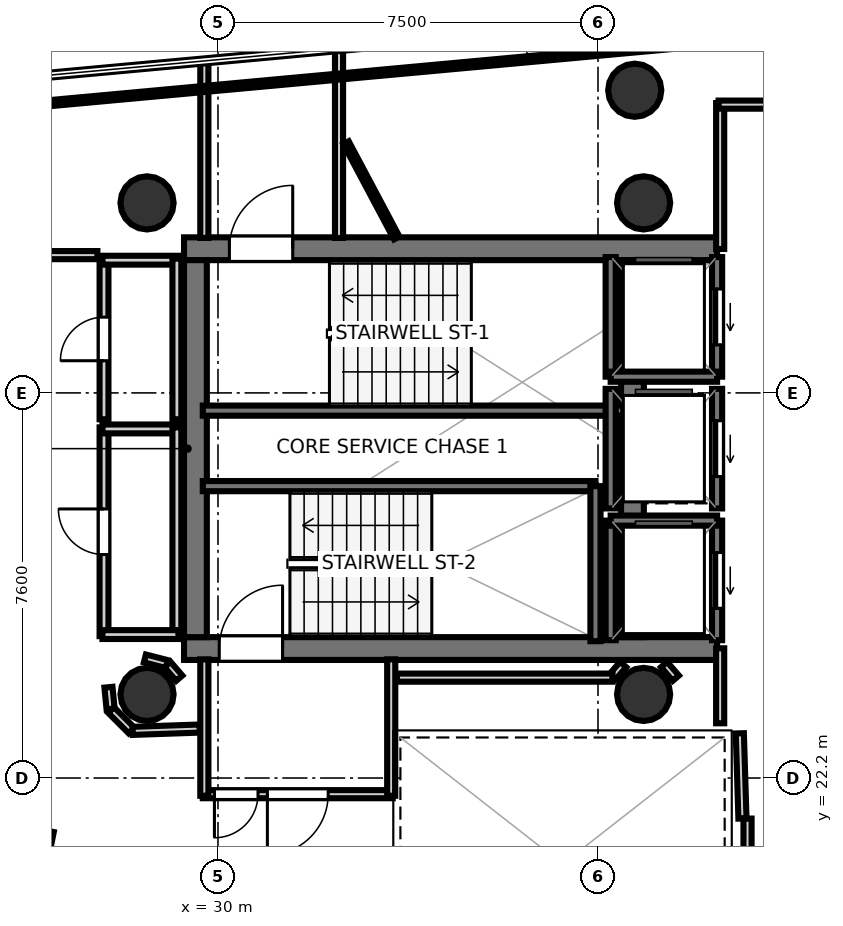
"""IFC4 building model, lengths in metres.
Left out: names, types, materials, properties, quantities, classifications, styles, units other than length and angle.
Written with IfcOpenShell. Run it as: python <this file> out.ifc"""

import sys

from ifc_helpers import new_model, si_unit, direction, frame, frame_2d, origin, origin_2d, place, context, subcontext, project, spatial, rectangle, hollow_circle, extrude, element, fill, save


model = new_model("IFC4")
c1 = context("Model", 3, precision=1e-05, world=origin(), true_north=direction((0.0, 1.0)))
c2 = subcontext(c1, "Body", "Model", "MODEL_VIEW")
j1 = project(units=[si_unit("LENGTHUNIT", "METRE"), si_unit("PLANEANGLEUNIT", "RADIAN")], contexts=[c1])
p1 = place(None, origin())
s1 = spatial("IfcSite", under=j1, at=p1, CompositionType="ELEMENT")
p2 = place(p1, origin())
s2 = spatial("IfcBuilding", under=s1, at=p2, CompositionType="ELEMENT")
p3 = place(p2, frame((0.0, 0.0, 272.3)))
s3 = spatial("IfcBuildingStorey", under=s2, at=p3, CompositionType="ELEMENT", Elevation=272.3)
p4 = place(p3, frame((29.33, 32.645, 0.0), z_axis=(0.0, 0.0, 1.0), x_axis=(1.0, 0.0, 0.0)))
e1 = element("IfcWall", 1, at=p4, inside=s3, PredefinedType="SHEAR", context=c2, shape_type="SweptSolid", body=[
    extrude(rectangle(XDim=10.52, YDim=0.45, at=frame_2d((5.26, 0.0))), origin(), (0.0, 0.0, 1.0), 3.4),
])
p5 = place(p4, frame((0.895, 0.0, 0.0)))
e2 = element("IfcOpeningElement", 2, at=p5, cuts=e1, PredefinedType="OPENING", context=c2, shape_type="SweptSolid", body=[
    extrude(rectangle(XDim=1.25, YDim=2.15, at=frame_2d((0.625, 1.075))), frame((0.0, 0.235, 0.0), z_axis=(0.0, -1.0, 0.0), x_axis=(1.0, 0.0, 0.0)), (0.0, 0.0, 1.0), 0.47),
])
p6 = place(p3, frame((29.33, 24.755, 0.0), z_axis=(0.0, 0.0, 1.0), x_axis=(1.0, 0.0, 0.0)))
e3 = element("IfcWall", 3, at=p6, inside=s3, PredefinedType="SHEAR", context=c2, shape_type="SweptSolid", body=[
    extrude(rectangle(XDim=10.52, YDim=0.45, at=frame_2d((5.26, 0.0))), origin(), (0.0, 0.0, 1.0), 3.4),
])
p7 = place(p6, frame((0.695, 0.0, 0.0)))
e4 = element("IfcOpeningElement", 4, at=p7, cuts=e3, PredefinedType="OPENING", context=c2, shape_type="SweptSolid", body=[
    extrude(rectangle(XDim=1.25, YDim=2.15, at=frame_2d((0.625, 1.075))), frame((0.0, 0.235, 0.0), z_axis=(0.0, -1.0, 0.0), x_axis=(1.0, 0.0, 0.0)), (0.0, 0.0, 1.0), 0.47),
])
for number, where, z_axis, x_axis in (
    (5, (29.555, 24.98, 0.0), (0.0, 0.0, 1.0), (0.0, 1.0, 0.0)),
    (6, (38.18, 24.98, 0.0), (0.0, 0.0, 1.0), (0.0, 1.0, 0.0)),
):
    element("IfcWall", number, at=place(p3, frame(where, z_axis=z_axis, x_axis=x_axis)), inside=s3, PredefinedType="SHEAR", context=c2, shape_type="SweptSolid", body=[
        extrude(rectangle(XDim=7.44, YDim=0.45, at=frame_2d((3.72, 0.0))), origin(), (0.0, 0.0, 1.0), 3.4),
    ])
for number, where, z_axis, x_axis in (
    (7, (28.6, 33.55, 0.0), (0.0, 0.0, 1.0), (1.0, 0.0, 0.0)),
    (8, (28.6, 23.85, 0.0), (0.0, 0.0, 1.0), (1.0, 0.0, 0.0)),
    (9, (38.4, 33.55, 0.0), (0.0, 0.0, 1.0), (1.0, 0.0, 0.0)),
    (10, (38.4, 23.85, 0.0), (0.0, 0.0, 1.0), (1.0, 0.0, 0.0)),
    (11, (38.225, 35.773, 0.0), (0.0, 0.0, 1.0), (1.0, 0.0, 0.0)),
):
    element("IfcColumn", number, at=place(p3, frame(where, z_axis=z_axis, x_axis=x_axis)), inside=s3, PredefinedType="COLUMN", context=c2, shape_type="SweptSolid", body=[
        extrude(hollow_circle(Radius=0.525, WallThickness=0.028, at=origin_2d()), origin(), (0.0, 0.0, 1.0), 3.7),
    ])
p8 = place(p3, frame((29.7, 29.45, 0.0), z_axis=(0.0, 0.0, 1.0), x_axis=(1.0, 0.0, 0.0)))
e12 = element("IfcWall", 12, at=p8, inside=s3, PredefinedType="SOLIDWALL", context=c2, shape_type="SweptSolid", body=[
    extrude(rectangle(XDim=8.3, YDim=0.2, at=frame_2d((4.15, 0.0))), origin(), (0.0, 0.0, 1.0), 3.4),
])
p9 = place(p3, frame((29.7, 27.96, 0.0), z_axis=(0.0, 0.0, 1.0), x_axis=(1.0, 0.0, 0.0)))
e13 = element("IfcWall", 13, at=p9, inside=s3, PredefinedType="SOLIDWALL", context=c2, shape_type="SweptSolid", body=[
    extrude(rectangle(XDim=7.75, YDim=0.2, at=frame_2d((3.875, 0.0))), origin(), (0.0, 0.0, 1.0), 3.4),
])
p10 = place(p3, frame((37.45, 24.9, 0.0), z_axis=(0.0, 0.0, 1.0), x_axis=(0.0, 1.0, 0.0)))
e14 = element("IfcWall", 14, at=p10, inside=s3, PredefinedType="SOLIDWALL", context=c2, shape_type="SweptSolid", body=[
    extrude(rectangle(XDim=3.06, YDim=0.2, at=frame_2d((1.53, 0.0))), origin(), (0.0, 0.0, 1.0), 3.4),
])
p11 = place(p3, frame((39.85, 30.12, 0.0), z_axis=(0.0, 0.0, 1.0), x_axis=(0.0, 1.0, 0.0)))
e15 = element("IfcWall", 15, at=p11, inside=s3, PredefinedType="SOLIDWALL", context=c2, shape_type="SweptSolid", body=[
    extrude(rectangle(XDim=2.36, YDim=0.2, at=frame_2d((1.18, 0.0))), origin(), (0.0, 0.0, 1.0), 3.4),
])
p12 = place(p11, frame((0.63, 0.0, 0.0)))
e16 = element("IfcOpeningElement", 16, at=p12, cuts=e15, PredefinedType="OPENING", context=c2, shape_type="SweptSolid", body=[
    extrude(rectangle(XDim=1.1, YDim=2.15, at=frame_2d((0.55, 1.075))), frame((0.0, 0.11, 0.0), z_axis=(0.0, -1.0, 0.0), x_axis=(1.0, 0.0, 0.0)), (0.0, 0.0, 1.0), 0.22),
])
p13 = place(p3, frame((37.75, 30.12, 0.0), z_axis=(0.0, 0.0, 1.0), x_axis=(0.0, 1.0, 0.0)))
e17 = element("IfcWall", 17, at=p13, inside=s3, PredefinedType="SOLIDWALL", context=c2, shape_type="SweptSolid", body=[
    extrude(rectangle(XDim=2.36, YDim=0.2, at=frame_2d((1.18, 0.0))), origin(), (0.0, 0.0, 1.0), 3.4),
])
p14 = place(p3, frame((37.75, 30.12, 0.0), z_axis=(0.0, 0.0, 1.0), x_axis=(1.0, 0.0, 0.0)))
e18 = element("IfcWall", 18, at=p14, inside=s3, PredefinedType="SOLIDWALL", context=c2, shape_type="SweptSolid", body=[
    extrude(rectangle(XDim=2.1, YDim=0.2, at=frame_2d((1.05, 0.0))), origin(), (0.0, 0.0, 1.0), 3.4),
])
p15 = place(p3, frame((39.85, 24.92, 0.0), z_axis=(0.0, 0.0, 1.0), x_axis=(0.0, 1.0, 0.0)))
e19 = element("IfcWall", 19, at=p15, inside=s3, PredefinedType="SOLIDWALL", context=c2, shape_type="SweptSolid", body=[
    extrude(rectangle(XDim=2.36, YDim=0.2, at=frame_2d((1.18, 0.0))), origin(), (0.0, 0.0, 1.0), 3.4),
])
p16 = place(p15, frame((0.63, 0.0, 0.0)))
e20 = element("IfcOpeningElement", 20, at=p16, cuts=e19, PredefinedType="OPENING", context=c2, shape_type="SweptSolid", body=[
    extrude(rectangle(XDim=1.1, YDim=2.15, at=frame_2d((0.55, 1.075))), frame((0.0, 0.11, 0.0), z_axis=(0.0, -1.0, 0.0), x_axis=(1.0, 0.0, 0.0)), (0.0, 0.0, 1.0), 0.22),
])
p17 = place(p3, frame((37.75, 24.92, 0.0), z_axis=(0.0, 0.0, 1.0), x_axis=(0.0, 1.0, 0.0)))
e21 = element("IfcWall", 21, at=p17, inside=s3, PredefinedType="SOLIDWALL", context=c2, shape_type="SweptSolid", body=[
    extrude(rectangle(XDim=2.36, YDim=0.2, at=frame_2d((1.18, 0.0))), origin(), (0.0, 0.0, 1.0), 3.4),
])
p18 = place(p3, frame((37.75, 27.28, 0.0), z_axis=(0.0, 0.0, 1.0), x_axis=(1.0, 0.0, 0.0)))
e22 = element("IfcWall", 22, at=p18, inside=s3, PredefinedType="SOLIDWALL", context=c2, shape_type="SweptSolid", body=[
    extrude(rectangle(XDim=2.1, YDim=0.2, at=frame_2d((1.05, 0.0))), origin(), (0.0, 0.0, 1.0), 3.4),
])
p19 = place(p3, frame((39.85, 27.52, 0.0), z_axis=(0.0, 0.0, 1.0), x_axis=(0.0, 1.0, 0.0)))
e23 = element("IfcWall", 23, at=p19, inside=s3, PredefinedType="SOLIDWALL", context=c2, shape_type="SweptSolid", body=[
    extrude(rectangle(XDim=2.36, YDim=0.2, at=frame_2d((1.18, 0.0))), origin(), (0.0, 0.0, 1.0), 3.4),
])
p20 = place(p19, frame((0.63, 0.0, 0.0)))
e24 = element("IfcOpeningElement", 24, at=p20, cuts=e23, PredefinedType="OPENING", context=c2, shape_type="SweptSolid", body=[
    extrude(rectangle(XDim=1.1, YDim=2.15, at=frame_2d((0.55, 1.075))), frame((0.0, 0.11, 0.0), z_axis=(0.0, -1.0, 0.0), x_axis=(1.0, 0.0, 0.0)), (0.0, 0.0, 1.0), 0.22),
])
p21 = place(p3, frame((37.75, 27.52, 0.0), z_axis=(0.0, 0.0, 1.0), x_axis=(0.0, 1.0, 0.0)))
e25 = element("IfcWall", 25, at=p21, inside=s3, PredefinedType="SOLIDWALL", context=c2, shape_type="SweptSolid", body=[
    extrude(rectangle(XDim=2.36, YDim=0.2, at=frame_2d((1.18, 0.0))), origin(), (0.0, 0.0, 1.0), 3.4),
])
p22 = place(p3, frame((29.731, 32.858, 0.0), z_axis=(0.0, 0.0, 1.0), x_axis=(0.0, 1.0, 0.0)))
e26 = element("IfcWall", 26, at=p22, inside=s3, PredefinedType="PARTITIONING", context=c2, shape_type="SweptSolid", body=[
    extrude(rectangle(XDim=3.514, YDim=0.16, at=frame_2d((1.757, 0.0))), origin(), (0.0, 0.0, 1.0), 2.72),
])
p23 = place(p3, frame((32.389, 36.616, 0.0), z_axis=(0.0, 0.0, 1.0), x_axis=(0.0, -1.0, 0.0)))
e27 = element("IfcWall", 27, at=p23, inside=s3, PredefinedType="PARTITIONING", context=c2, shape_type="SweptSolid", body=[
    extrude(rectangle(XDim=3.758, YDim=0.16, at=frame_2d((1.879, 0.0))), origin(), (0.0, 0.0, 1.0), 2.72),
])
p24 = place(p3, frame((33.45, 21.881, 0.0), z_axis=(0.0, 0.0, 1.0), x_axis=(-1.0, 0.0, 0.0)))
e28 = element("IfcWall", 28, at=p24, inside=s3, PredefinedType="PARTITIONING", context=c2, shape_type="SweptSolid", body=[
    extrude(rectangle(XDim=3.75, YDim=0.16, at=frame_2d((1.875, 0.0))), origin(), (0.0, 0.0, 1.0), 2.72),
])
p25 = place(p24, frame((1.275, 0.0, 0.0)))
e29 = element("IfcOpeningElement", 29, at=p25, cuts=e28, PredefinedType="OPENING", context=c2, shape_type="SweptSolid", body=[
    extrude(rectangle(XDim=1.2, YDim=2.15, at=frame_2d((0.6, 1.075))), frame((0.0, 0.09, 0.0), z_axis=(0.0, -1.0, 0.0), x_axis=(1.0, 0.0, 0.0)), (0.0, 0.0, 1.0), 0.18),
])
p26 = place(p24, frame((2.66, 0.0, 0.0)))
e30 = element("IfcOpeningElement", 30, at=p26, cuts=e28, PredefinedType="OPENING", context=c2, shape_type="SweptSolid", body=[
    extrude(rectangle(XDim=0.86, YDim=2.05, at=frame_2d((0.43, 1.025))), frame((0.0, 0.09, 0.0), z_axis=(0.0, -1.0, 0.0), x_axis=(1.0, 0.0, 0.0)), (0.0, 0.0, 1.0), 0.18),
])
for number, where, z_axis, x_axis in (
    (31, (29.731, 21.85, 0.0), (0.0, 0.0, 1.0), (0.0, 1.0, 0.0)),
    (32, (33.419, 24.542, 0.0), (0.0, 0.0, 1.0), (0.0, -1.0, 0.0)),
):
    element("IfcWall", number, at=place(p3, frame(where, z_axis=z_axis, x_axis=x_axis)), inside=s3, PredefinedType="PARTITIONING", context=c2, shape_type="SweptSolid", body=[
        extrude(rectangle(XDim=2.692, YDim=0.16, at=frame_2d((1.346, 0.0))), origin(), (0.0, 0.0, 1.0), 2.72),
    ])
p27 = place(p3, frame((40.351, 21.401, 0.0), z_axis=(0.0, 0.0, 1.0), x_axis=(-0.031058045979, 0.999517582527, 0.0)))
e33 = element("IfcWall", 33, at=p27, inside=s3, PredefinedType="PARTITIONING", context=c2, shape_type="SweptSolid", body=[
    extrude(rectangle(XDim=1.682, YDim=0.16, at=frame_2d((0.841, 0.0))), origin(), (0.0, 0.0, 1.0), 2.72),
])
p28 = place(p3, frame((39.911, 23.28, 0.0), z_axis=(0.0, 0.0, 1.0), x_axis=(0.0, 1.0, 0.0)))
e34 = element("IfcWall", 34, at=p28, inside=s3, PredefinedType="PARTITIONING", context=c2, shape_type="SweptSolid", body=[
    extrude(rectangle(XDim=1.48, YDim=0.16, at=frame_2d((0.74, 0.0))), origin(), (0.0, 0.0, 1.0), 2.72),
])
p29 = place(p3, frame((39.911, 32.64, 0.0), z_axis=(0.0, 0.0, 1.0), x_axis=(0.0, 1.0, 0.0)))
e35 = element("IfcWall", 35, at=p29, inside=s3, PredefinedType="PARTITIONING", context=c2, shape_type="SweptSolid", body=[
    extrude(rectangle(XDim=2.88, YDim=0.16, at=frame_2d((1.44, 0.0))), origin(), (0.0, 0.0, 1.0), 2.72),
])
p30 = place(p3, frame((39.88, 35.489, 0.0), z_axis=(0.0, 0.0, 1.0), x_axis=(1.0, 0.0, 0.0)))
e36 = element("IfcWall", 36, at=p30, inside=s3, PredefinedType="PARTITIONING", context=c2, shape_type="SweptSolid", body=[
    extrude(rectangle(XDim=1.48, YDim=0.16, at=frame_2d((0.74, 0.0))), origin(), (0.0, 0.0, 1.0), 2.72),
])
p31 = place(p3, frame((40.451, 18.08, 0.0), z_axis=(0.0, 0.0, 1.0), x_axis=(0.0, 1.0, 0.0)))
e37 = element("IfcWall", 37, at=p31, inside=s3, PredefinedType="PARTITIONING", context=c2, shape_type="SweptSolid", body=[
    extrude(rectangle(XDim=3.32, YDim=0.16, at=frame_2d((1.66, 0.0))), origin(), (0.0, 0.0, 1.0), 2.72),
])
p32 = place(p3, frame((27.751, 25.0, 0.0), z_axis=(0.0, 0.0, 1.0), x_axis=(0.0, 1.0, 0.0)))
e38 = element("IfcWall", 38, at=p32, inside=s3, PredefinedType="PLUMBINGWALL", context=c2, shape_type="SweptSolid", body=[
    extrude(rectangle(XDim=4.12, YDim=0.175, at=frame_2d((2.06, 0.0))), origin(), (0.0, 0.0, 1.0), 2.72),
])
p33 = place(p32, frame((1.61, 0.0, 0.0)))
e39 = element("IfcOpeningElement", 39, at=p33, cuts=e38, PredefinedType="OPENING", context=c2, shape_type="SweptSolid", body=[
    extrude(rectangle(XDim=0.9, YDim=2.1, at=frame_2d((0.45, 1.05))), frame((0.0, 0.097, 0.0), z_axis=(0.0, -1.0, 0.0), x_axis=(1.0, 0.0, 0.0)), (0.0, 0.0, 1.0), 0.195),
])
p34 = place(p3, frame((27.72, 29.089, 0.0), z_axis=(0.0, 0.0, 1.0), x_axis=(1.0, 0.0, 0.0)))
e40 = element("IfcWall", 40, at=p34, inside=s3, PredefinedType="PLUMBINGWALL", context=c2, shape_type="SweptSolid", body=[
    extrude(rectangle(XDim=1.5, YDim=0.175, at=frame_2d((0.75, 0.0))), origin(), (0.0, 0.0, 1.0), 2.72),
])
p35 = place(p3, frame((29.189, 29.12, 0.0), z_axis=(0.0, 0.0, 1.0), x_axis=(0.0, -1.0, 0.0)))
e41 = element("IfcWall", 41, at=p35, inside=s3, PredefinedType="PLUMBINGWALL", context=c2, shape_type="SweptSolid", body=[
    extrude(rectangle(XDim=4.12, YDim=0.175, at=frame_2d((2.06, 0.0))), origin(), (0.0, 0.0, 1.0), 2.72),
])
p36 = place(p3, frame((29.22, 25.031, 0.0), z_axis=(0.0, 0.0, 1.0), x_axis=(-1.0, 0.0, 0.0)))
e42 = element("IfcWall", 42, at=p36, inside=s3, PredefinedType="PLUMBINGWALL", context=c2, shape_type="SweptSolid", body=[
    extrude(rectangle(XDim=1.5, YDim=0.175, at=frame_2d((0.75, 0.0))), origin(), (0.0, 0.0, 1.0), 2.72),
])
p37 = place(p3, frame((27.751, 29.28, 0.0), z_axis=(0.0, 0.0, 1.0), x_axis=(0.0, 1.0, 0.0)))
e43 = element("IfcWall", 43, at=p37, inside=s3, PredefinedType="PLUMBINGWALL", context=c2, shape_type="SweptSolid", body=[
    extrude(rectangle(XDim=3.17, YDim=0.175, at=frame_2d((1.585, 0.0))), origin(), (0.0, 0.0, 1.0), 2.72),
])
p38 = place(p37, frame((1.155, 0.0, 0.0)))
e44 = element("IfcOpeningElement", 44, at=p38, cuts=e43, PredefinedType="OPENING", context=c2, shape_type="SweptSolid", body=[
    extrude(rectangle(XDim=0.86, YDim=2.05, at=frame_2d((0.43, 1.025))), frame((0.0, 0.097, 0.0), z_axis=(0.0, -1.0, 0.0), x_axis=(1.0, 0.0, 0.0)), (0.0, 0.0, 1.0), 0.195),
])
p39 = place(p3, frame((27.72, 32.419, 0.0), z_axis=(0.0, 0.0, 1.0), x_axis=(1.0, 0.0, 0.0)))
e45 = element("IfcWall", 45, at=p39, inside=s3, PredefinedType="PLUMBINGWALL", context=c2, shape_type="SweptSolid", body=[
    extrude(rectangle(XDim=1.5, YDim=0.175, at=frame_2d((0.75, 0.0))), origin(), (0.0, 0.0, 1.0), 2.72),
])
p40 = place(p3, frame((29.189, 32.45, 0.0), z_axis=(0.0, 0.0, 1.0), x_axis=(0.0, -1.0, 0.0)))
e46 = element("IfcWall", 46, at=p40, inside=s3, PredefinedType="PLUMBINGWALL", context=c2, shape_type="SweptSolid", body=[
    extrude(rectangle(XDim=3.17, YDim=0.175, at=frame_2d((1.585, 0.0))), origin(), (0.0, 0.0, 1.0), 2.72),
])
p41 = place(p3, frame((29.236, 24.17, 0.0), z_axis=(0.0, 0.0, 1.0), x_axis=(-0.652260263346, 0.757995084984, 0.0)))
e47 = element("IfcWall", 47, at=p41, inside=s3, PredefinedType="PARTITIONING", context=c2, shape_type="SweptSolid", body=[
    extrude(rectangle(XDim=0.355, YDim=0.16, at=frame_2d((0.178, 0.0))), origin(), (0.0, 0.0, 1.0), 2.72),
])
p42 = place(p3, frame((28.988, 24.45, 0.0), z_axis=(0.0, 0.0, 1.0), x_axis=(-0.968704505916, 0.248216800836, 0.0)))
e48 = element("IfcWall", 48, at=p42, inside=s3, PredefinedType="PARTITIONING", context=c2, shape_type="SweptSolid", body=[
    extrude(rectangle(XDim=0.445, YDim=0.16, at=frame_2d((0.222, 0.0))), origin(), (0.0, 0.0, 1.0), 2.72),
])
p43 = place(p3, frame((39.036, 24.17, 0.0), z_axis=(0.0, 0.0, 1.0), x_axis=(-0.652260263346, 0.757995084984, 0.0)))
e49 = element("IfcWall", 49, at=p43, inside=s3, PredefinedType="PARTITIONING", context=c2, shape_type="SweptSolid", body=[
    extrude(rectangle(XDim=0.355, YDim=0.16, at=frame_2d((0.178, 0.0))), origin(), (0.0, 0.0, 1.0), 2.72),
])
p44 = place(p3, frame((37.996, 24.44, 0.0), z_axis=(0.0, 0.0, 1.0), x_axis=(-0.652425645794, -0.757852740782, 0.0)))
e50 = element("IfcWall", 50, at=p44, inside=s3, PredefinedType="PARTITIONING", context=c2, shape_type="SweptSolid", body=[
    extrude(rectangle(XDim=0.32, YDim=0.16, at=frame_2d((0.16, 0.0))), origin(), (0.0, 0.0, 1.0), 2.72),
])
p45 = place(p3, frame((37.787, 24.181, 0.0), z_axis=(0.0, 0.0, 1.0), x_axis=(-1.0, 0.0, 0.0)))
e51 = element("IfcWall", 51, at=p45, inside=s3, PredefinedType="PARTITIONING", context=c2, shape_type="SweptSolid", body=[
    extrude(rectangle(XDim=4.257, YDim=0.16, at=frame_2d((2.129, 0.0))), origin(), (0.0, 0.0, 1.0), 2.72),
])
p46 = place(p3, frame((27.838, 23.992, 0.0), z_axis=(0.0, 0.0, 1.0), x_axis=(0.098273407977, -0.995159453196, 0.0)))
e52 = element("IfcWall", 52, at=p46, inside=s3, PredefinedType="PARTITIONING", context=c2, shape_type="SweptSolid", body=[
    extrude(rectangle(XDim=0.432, YDim=0.16, at=frame_2d((0.216, 0.0))), origin(), (0.0, 0.0, 1.0), 2.72),
])
p47 = place(p3, frame((27.89, 23.543, 0.0), z_axis=(0.0, 0.0, 1.0), x_axis=(0.707106781187, -0.707106781187, 0.0)))
e53 = element("IfcWall", 53, at=p47, inside=s3, PredefinedType="PARTITIONING", context=c2, shape_type="SweptSolid", body=[
    extrude(rectangle(XDim=0.57, YDim=0.16, at=frame_2d((0.285, 0.0))), origin(), (0.0, 0.0, 1.0), 2.72),
])
p48 = place(p3, frame((28.316, 23.131, 0.0), z_axis=(0.0, 0.0, 1.0), x_axis=(0.999405342193, 0.034481328227, 0.0)))
e54 = element("IfcWall", 54, at=p48, inside=s3, PredefinedType="PARTITIONING", context=c2, shape_type="SweptSolid", body=[
    extrude(rectangle(XDim=1.324, YDim=0.16, at=frame_2d((0.662, 0.0))), origin(), (0.0, 0.0, 1.0), 2.72),
])
p49 = place(p3, frame((25.951, 17.535, 0.0), z_axis=(0.0, 0.0, 1.0), x_axis=(0.197834740862, 0.980235387704, 0.0)))
e55 = element("IfcWall", 55, at=p49, inside=s3, PredefinedType="PARTITIONING", context=c2, shape_type="SweptSolid", body=[
    extrude(rectangle(XDim=3.688, YDim=0.16, at=frame_2d((1.844, 0.0))), origin(), (0.0, 0.0, 1.0), 2.72),
])
p50 = place(p3, frame((25.25, 32.519, 0.0), z_axis=(0.0, 0.0, 1.0), x_axis=(1.0, 0.0, 0.0)))
e56 = element("IfcWall", 56, at=p50, inside=s3, PredefinedType="PARTITIONING", context=c2, shape_type="SweptSolid", body=[
    extrude(rectangle(XDim=2.37, YDim=0.16, at=frame_2d((1.185, 0.0))), origin(), (0.0, 0.0, 1.0), 2.72),
])
p51 = place(p3, frame((20.896, 34.987, 0.0), z_axis=(0.0, 0.0, 1.0), x_axis=(0.995809385276, 0.091453092875, 0.0)))
e57 = element("IfcWall", 57, at=p51, inside=s3, PredefinedType="PARTITIONING", context=c2, shape_type="SweptSolid", body=[
    extrude(rectangle(XDim=34.985, YDim=0.12, at=frame_2d((17.492, 0.0))), origin(), (0.0, 0.0, 1.0), 2.72),
])
p52 = place(p3, frame((33.528, 32.858, 0.0), z_axis=(0.0, 0.0, 1.0), x_axis=(-0.46963008212, 0.882863288379, 0.0)))
e58 = element("IfcWall", 58, at=p52, inside=s3, PredefinedType="PARTITIONING", context=c2, shape_type="SweptSolid", body=[
    extrude(rectangle(XDim=2.13, YDim=0.12, at=frame_2d((1.065, 0.0))), origin(), (0.0, 0.0, 1.0), 2.72),
])
p53 = place(p5, origin())
e59 = element("IfcDoor", 59, at=p53, inside=s3, OperationType="SINGLE_SWING_RIGHT", PredefinedType="DOOR", context=c2, shape_type="SweptSolid", body=[
    extrude(rectangle(XDim=1.25, YDim=2.15, at=frame_2d((0.625, 1.075))), frame((0.0, 0.025, 0.0), z_axis=(0.0, -1.0, 0.0), x_axis=(1.0, 0.0, 0.0)), (0.0, 0.0, 1.0), 0.05),
])
fill(e2, e59)
p54 = place(p7, origin())
e60 = element("IfcDoor", 60, at=p54, inside=s3, OperationType="SINGLE_SWING_RIGHT", PredefinedType="DOOR", context=c2, shape_type="SweptSolid", body=[
    extrude(rectangle(XDim=1.25, YDim=2.15, at=frame_2d((0.625, 1.075))), frame((0.0, 0.025, 0.0), z_axis=(0.0, -1.0, 0.0), x_axis=(1.0, 0.0, 0.0)), (0.0, 0.0, 1.0), 0.05),
])
fill(e4, e60)
p55 = place(p12, origin())
e61 = element("IfcDoor", 61, at=p55, inside=s3, OperationType="SLIDING_TO_LEFT", PredefinedType="DOOR", context=c2, shape_type="SweptSolid", body=[
    extrude(rectangle(XDim=1.1, YDim=2.15, at=frame_2d((0.55, 1.075))), frame((0.0, 0.025, 0.0), z_axis=(0.0, -1.0, 0.0), x_axis=(1.0, 0.0, 0.0)), (0.0, 0.0, 1.0), 0.05),
])
fill(e16, e61)
p56 = place(p16, origin())
e62 = element("IfcDoor", 62, at=p56, inside=s3, OperationType="SLIDING_TO_LEFT", PredefinedType="DOOR", context=c2, shape_type="SweptSolid", body=[
    extrude(rectangle(XDim=1.1, YDim=2.15, at=frame_2d((0.55, 1.075))), frame((0.0, 0.025, 0.0), z_axis=(0.0, -1.0, 0.0), x_axis=(1.0, 0.0, 0.0)), (0.0, 0.0, 1.0), 0.05),
])
fill(e20, e62)
p57 = place(p20, origin())
e63 = element("IfcDoor", 63, at=p57, inside=s3, OperationType="SLIDING_TO_LEFT", PredefinedType="DOOR", context=c2, shape_type="SweptSolid", body=[
    extrude(rectangle(XDim=1.1, YDim=2.15, at=frame_2d((0.55, 1.075))), frame((0.0, 0.025, 0.0), z_axis=(0.0, -1.0, 0.0), x_axis=(1.0, 0.0, 0.0)), (0.0, 0.0, 1.0), 0.05),
])
fill(e24, e63)
p58 = place(p25, origin())
e64 = element("IfcDoor", 64, at=p58, inside=s3, OperationType="SINGLE_SWING_RIGHT", PredefinedType="DOOR", context=c2, shape_type="SweptSolid", body=[
    extrude(rectangle(XDim=1.2, YDim=2.15, at=frame_2d((0.6, 1.075))), frame((0.0, 0.025, 0.0), z_axis=(0.0, -1.0, 0.0), x_axis=(1.0, 0.0, 0.0)), (0.0, 0.0, 1.0), 0.05),
])
fill(e29, e64)
p59 = place(p33, origin())
e65 = element("IfcDoor", 65, at=p59, inside=s3, OperationType="SINGLE_SWING_RIGHT", PredefinedType="DOOR", context=c2, shape_type="SweptSolid", body=[
    extrude(rectangle(XDim=0.9, YDim=2.1, at=frame_2d((0.45, 1.05))), frame((0.0, 0.025, 0.0), z_axis=(0.0, -1.0, 0.0), x_axis=(1.0, 0.0, 0.0)), (0.0, 0.0, 1.0), 0.05),
])
fill(e39, e65)
p60 = place(p38, origin())
e66 = element("IfcDoor", 66, at=p60, inside=s3, OperationType="SINGLE_SWING_LEFT", PredefinedType="DOOR", context=c2, shape_type="SweptSolid", body=[
    extrude(rectangle(XDim=0.86, YDim=2.05, at=frame_2d((0.43, 1.025))), frame((0.0, 0.025, 0.0), z_axis=(0.0, -1.0, 0.0), x_axis=(1.0, 0.0, 0.0)), (0.0, 0.0, 1.0), 0.05),
])
fill(e44, e66)
p61 = place(p26, origin())
e67 = element("IfcDoor", 67, at=p61, inside=s3, OperationType="SINGLE_SWING_RIGHT", PredefinedType="DOOR", context=c2, shape_type="SweptSolid", body=[
    extrude(rectangle(XDim=0.86, YDim=2.05, at=frame_2d((0.43, 1.025))), frame((0.0, 0.025, 0.0), z_axis=(0.0, -1.0, 0.0), x_axis=(1.0, 0.0, 0.0)), (0.0, 0.0, 1.0), 0.05),
])
fill(e30, e67)
save(model, sys.argv[1])
